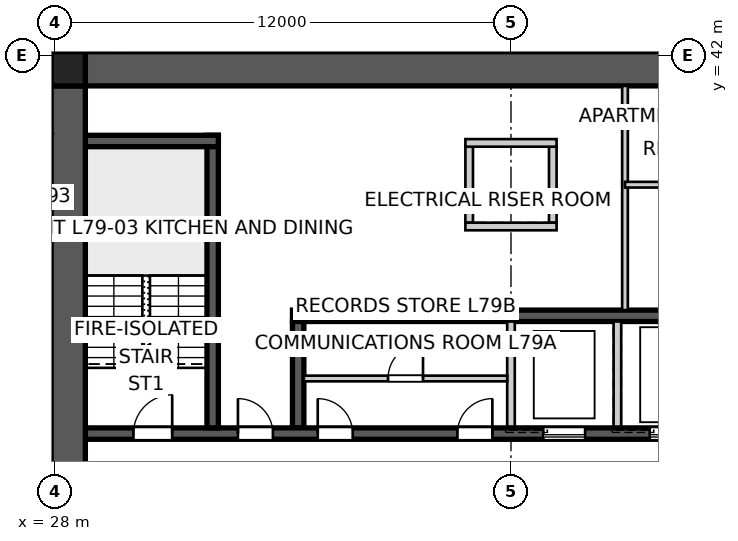
"""IFC4 building model, lengths in metres.
Left out: names, types, materials, properties, quantities, classifications, styles, units other than length and angle.
Written with IfcOpenShell. Run it as: python <this file> out.ifc"""

import sys

from ifc_helpers import new_model, si_unit, direction, frame, frame_2d, origin, origin_2d, place, context, subcontext, project, spatial, polyline, rectangle, outline, extrude, element, fill, save


model = new_model("IFC4")
c1 = context("Model", 3, precision=1e-05, world=origin(), true_north=direction((0.0, 1.0)))
c2 = subcontext(c1, "Body", "Model", "MODEL_VIEW")
j1 = project(units=[si_unit("LENGTHUNIT", "METRE"), si_unit("PLANEANGLEUNIT", "RADIAN")], contexts=[c1])
p1 = place(None, origin())
s1 = spatial("IfcSite", under=j1, at=p1, CompositionType="ELEMENT")
p2 = place(p1, origin())
s2 = spatial("IfcBuilding", under=s1, at=p2, CompositionType="ELEMENT")
p3 = place(p2, frame((0.0, 0.0, 286.2)))
s3 = spatial("IfcBuildingStorey", under=s2, at=p3, CompositionType="ELEMENT", Elevation=286.2)
p4 = place(p3, frame((28.8, 41.65, 0.0), z_axis=(0.0, 0.0, 1.0), x_axis=(1.0, 0.0, 0.0)))
e1 = element("IfcWall", 1, at=p4, inside=s3, PredefinedType="SHEAR", context=c2, shape_type="SweptSolid", body=[
    extrude(outline(polyline([(0.0, -0.45), (22.4, -0.45), (22.4, -0.025), (22.85, -0.025), (22.85, 0.025), (22.4, 0.025), (22.4, 0.45), (0.0, 0.45), (0.0, 0.025), (-0.45, 0.025), (-0.45, -0.025), (0.0, -0.025), (0.0, -0.45)])), origin(), (0.0, 0.0, 1.0), 3.4),
])
p5 = place(p3, frame((28.35, 41.2, 0.0), z_axis=(0.0, 0.0, 1.0), x_axis=(0.0, -1.0, 0.0)))
e2 = element("IfcWall", 2, at=p5, inside=s3, PredefinedType="SHEAR", context=c2, shape_type="SweptSolid", body=[
    extrude(outline(polyline([(0.0, -0.45), (22.4, -0.45), (22.4, -0.025), (22.85, -0.025), (22.85, 0.025), (22.4, 0.025), (22.4, 0.45), (0.0, 0.45), (0.0, 0.025), (-0.45, 0.025), (-0.45, -0.025), (0.0, -0.025), (0.0, -0.45)])), origin(), (0.0, 0.0, 1.0), 3.4),
])
p6 = place(p5, frame((11.14, 0.0, 0.0)))
e3 = element("IfcOpeningElement", 3, at=p6, cuts=e2, PredefinedType="OPENING", context=c2, shape_type="SweptSolid", body=[
    extrude(rectangle(XDim=1.02, YDim=2.4, at=frame_2d((0.51, 1.2))), frame((0.0, 0.46, 0.0), z_axis=(0.0, -1.0, 0.0), x_axis=(1.0, 0.0, 0.0)), (0.0, 0.0, 1.0), 0.92),
])
p7 = place(p3, frame((28.8, 32.05, 0.0), z_axis=(0.0, 0.0, 1.0), x_axis=(1.0, 0.0, 0.0)))
e4 = element("IfcWall", 4, at=p7, inside=s3, PredefinedType="SHEAR", context=c2, shape_type="SweptSolid", body=[
    extrude(rectangle(XDim=22.4, YDim=0.3, at=frame_2d((11.2, 0.0))), origin(), (0.0, 0.0, 1.0), 3.4),
])
p8 = place(p7, frame((19.04, 0.0, 0.0)))
e5 = element("IfcOpeningElement", 5, at=p8, cuts=e4, PredefinedType="OPENING", context=c2, shape_type="SweptSolid", body=[
    extrude(rectangle(XDim=0.92, YDim=2.1, at=frame_2d((0.46, 1.05))), frame((0.0, 0.16, 0.0), z_axis=(0.0, -1.0, 0.0), x_axis=(1.0, 0.0, 0.0)), (0.0, 0.0, 1.0), 0.32),
])
p9 = place(p7, frame((1.265, 0.0, 0.0)))
e6 = element("IfcOpeningElement", 6, at=p9, cuts=e4, PredefinedType="OPENING", context=c2, shape_type="SweptSolid", body=[
    extrude(rectangle(XDim=1.02, YDim=2.1, at=frame_2d((0.51, 1.05))), frame((0.0, 0.16, 0.0), z_axis=(0.0, -1.0, 0.0), x_axis=(1.0, 0.0, 0.0)), (0.0, 0.0, 1.0), 0.32),
])
p10 = place(p7, frame((4.015, 0.0, 0.0)))
e7 = element("IfcOpeningElement", 7, at=p10, cuts=e4, PredefinedType="OPENING", context=c2, shape_type="SweptSolid", body=[
    extrude(rectangle(XDim=0.92, YDim=2.1, at=frame_2d((0.46, 1.05))), frame((0.0, 0.16, 0.0), z_axis=(0.0, -1.0, 0.0), x_axis=(1.0, 0.0, 0.0)), (0.0, 0.0, 1.0), 0.32),
])
p11 = place(p7, frame((6.115, 0.0, 0.0)))
e8 = element("IfcOpeningElement", 8, at=p11, cuts=e4, PredefinedType="OPENING", context=c2, shape_type="SweptSolid", body=[
    extrude(rectangle(XDim=0.92, YDim=2.1, at=frame_2d((0.46, 1.05))), frame((0.0, 0.16, 0.0), z_axis=(0.0, -1.0, 0.0), x_axis=(1.0, 0.0, 0.0)), (0.0, 0.0, 1.0), 0.32),
])
p12 = place(p7, frame((9.79, 0.0, 0.0)))
e9 = element("IfcOpeningElement", 9, at=p12, cuts=e4, PredefinedType="OPENING", context=c2, shape_type="SweptSolid", body=[
    extrude(rectangle(XDim=0.92, YDim=2.1, at=frame_2d((0.46, 1.05))), frame((0.0, 0.16, 0.0), z_axis=(0.0, -1.0, 0.0), x_axis=(1.0, 0.0, 0.0)), (0.0, 0.0, 1.0), 0.32),
])
p13 = place(p7, frame((12.05, 0.0, 0.0)))
e10 = element("IfcOpeningElement", 10, at=p13, cuts=e4, PredefinedType="OPENING", context=c2, shape_type="SweptSolid", body=[
    extrude(rectangle(XDim=1.1, YDim=2.1, at=frame_2d((0.55, 1.05))), frame((0.0, 0.16, 0.0), z_axis=(0.0, -1.0, 0.0), x_axis=(1.0, 0.0, 0.0)), (0.0, 0.0, 1.0), 0.32),
])
p14 = place(p7, frame((14.85, 0.0, 0.0)))
e11 = element("IfcOpeningElement", 11, at=p14, cuts=e4, PredefinedType="OPENING", context=c2, shape_type="SweptSolid", body=[
    extrude(rectangle(XDim=1.1, YDim=2.1, at=frame_2d((0.55, 1.05))), frame((0.0, 0.16, 0.0), z_axis=(0.0, -1.0, 0.0), x_axis=(1.0, 0.0, 0.0)), (0.0, 0.0, 1.0), 0.32),
])
p15 = place(p3, frame((34.25, 35.15, 0.0), z_axis=(0.0, 0.0, 1.0), x_axis=(1.0, 0.0, 0.0)))
e12 = element("IfcWall", 12, at=p15, inside=s3, PredefinedType="SHEAR", context=c2, shape_type="SweptSolid", body=[
    extrude(rectangle(XDim=11.5, YDim=0.3, at=frame_2d((5.75, 0.0))), origin(), (0.0, 0.0, 1.0), 3.4),
])
p16 = place(p3, frame((34.4, 32.2, 0.0), z_axis=(0.0, 0.0, 1.0), x_axis=(0.0, 1.0, 0.0)))
e13 = element("IfcWall", 13, at=p16, inside=s3, PredefinedType="SHEAR", context=c2, shape_type="SweptSolid", body=[
    extrude(rectangle(XDim=2.8, YDim=0.3, at=frame_2d((1.4, 0.0))), origin(), (0.0, 0.0, 1.0), 3.4),
])
for number, where, z_axis, x_axis in (
    (14, (40.0, 32.2, 0.0), (0.0, 0.0, 1.0), (0.0, 1.0, 0.0)),
    (15, (42.8, 32.2, 0.0), (0.0, 0.0, 1.0), (0.0, 1.0, 0.0)),
):
    element("IfcWall", number, at=place(p3, frame(where, z_axis=z_axis, x_axis=x_axis)), inside=s3, PredefinedType="SOLIDWALL", context=c2, shape_type="SweptSolid", body=[
        extrude(rectangle(XDim=2.8, YDim=0.2, at=frame_2d((1.4, 0.0))), origin(), (0.0, 0.0, 1.0), 3.4),
    ])
p17 = place(p3, frame((32.15, 32.2, 0.0), z_axis=(0.0, 0.0, 1.0), x_axis=(0.0, 1.0, 0.0)))
e16 = element("IfcWall", 16, at=p17, inside=s3, PredefinedType="SHEAR", context=c2, shape_type="SweptSolid", body=[
    extrude(rectangle(XDim=7.7, YDim=0.3, at=frame_2d((3.85, 0.0))), origin(), (0.0, 0.0, 1.0), 3.4),
])
p18 = place(p3, frame((28.8, 39.75, 0.0), z_axis=(0.0, 0.0, 1.0), x_axis=(1.0, 0.0, 0.0)))
e17 = element("IfcWall", 17, at=p18, inside=s3, PredefinedType="SHEAR", context=c2, shape_type="SweptSolid", body=[
    extrude(rectangle(XDim=3.5, YDim=0.3, at=frame_2d((1.75, 0.0))), origin(), (0.0, 0.0, 1.0), 3.4),
])
for number, where, z_axis, x_axis in (
    (18, (38.9, 37.6, 0.0), (0.0, 0.0, 1.0), (0.0, 1.0, 0.0)),
    (19, (41.1, 37.6, 0.0), (0.0, 0.0, 1.0), (0.0, 1.0, 0.0)),
):
    element("IfcWall", number, at=place(p3, frame(where, z_axis=z_axis, x_axis=x_axis)), inside=s3, PredefinedType="SOLIDWALL", context=c2, shape_type="SweptSolid", body=[
        extrude(rectangle(XDim=2.0, YDim=0.2, at=frame_2d((1.0, 0.0))), origin(), (0.0, 0.0, 1.0), 3.4),
    ])
for number, where, z_axis, x_axis in (
    (20, (38.8, 37.5, 0.0), (0.0, 0.0, 1.0), (1.0, 0.0, 0.0)),
    (21, (38.8, 39.7, 0.0), (0.0, 0.0, 1.0), (1.0, 0.0, 0.0)),
):
    element("IfcWall", number, at=place(p3, frame(where, z_axis=z_axis, x_axis=x_axis)), inside=s3, PredefinedType="SOLIDWALL", context=c2, shape_type="SweptSolid", body=[
        extrude(rectangle(XDim=2.4, YDim=0.2, at=frame_2d((1.2, 0.0))), origin(), (0.0, 0.0, 1.0), 3.4),
    ])
p19 = place(p3, frame((28.35, 41.65, 0.0), z_axis=(0.0, 0.0, 1.0), x_axis=(1.0, 0.0, 0.0)))
e22 = element("IfcColumn", 22, at=p19, inside=s3, PredefinedType="COLUMN", context=c2, shape_type="SweptSolid", body=[
    extrude(rectangle(XDim=0.9, YDim=0.9, at=origin_2d()), origin(), (0.0, 0.0, 1.0), 3.4),
])
p20 = place(p3, frame((26.823, 45.704, 0.0), z_axis=(0.0, 0.0, 1.0), x_axis=(0.64279957712, -0.76603440109, 0.0)))
e23 = element("IfcWall", 23, at=p20, inside=s3, PredefinedType="PARTITIONING", context=c2, shape_type="SweptSolid", body=[
    extrude(rectangle(XDim=4.64, YDim=0.25, at=frame_2d((2.32, 0.0))), origin(), (0.0, 0.0, 1.0), 3.25),
])
p21 = place(p3, frame((43.0, 41.2, 0.0), z_axis=(0.0, 0.0, 1.0), x_axis=(0.0, -1.0, 0.0)))
e24 = element("IfcWall", 24, at=p21, inside=s3, PredefinedType="SOLIDWALL", context=c2, shape_type="SweptSolid", body=[
    extrude(rectangle(XDim=5.9, YDim=0.15, at=frame_2d((2.95, 0.0))), origin(), (0.0, 0.0, 1.0), 3.25),
])
p22 = place(p3, frame((43.0, 38.6, 0.0), z_axis=(0.0, 0.0, 1.0), x_axis=(1.0, 0.0, 0.0)))
e25 = element("IfcWall", 25, at=p22, inside=s3, PredefinedType="SOLIDWALL", context=c2, shape_type="SweptSolid", body=[
    extrude(rectangle(XDim=8.2, YDim=0.15, at=frame_2d((4.1, 0.0))), origin(), (0.0, 0.0, 1.0), 3.25),
])
p23 = place(p22, frame((3.64, 0.0, 0.0)))
e26 = element("IfcOpeningElement", 26, at=p23, cuts=e25, PredefinedType="OPENING", context=c2, shape_type="SweptSolid", body=[
    extrude(rectangle(XDim=0.92, YDim=2.1, at=frame_2d((0.46, 1.05))), frame((0.0, 0.085, 0.0), z_axis=(0.0, -1.0, 0.0), x_axis=(1.0, 0.0, 0.0)), (0.0, 0.0, 1.0), 0.17),
])
p24 = place(p3, frame((27.9, 39.913, 0.0), z_axis=(0.0, 0.0, 1.0), x_axis=(-0.64279031777, 0.766042170759, 0.0)))
e27 = element("IfcWall", 27, at=p24, inside=s3, PredefinedType="PARTITIONING", context=c2, shape_type="SweptSolid", body=[
    extrude(rectangle(XDim=5.089, YDim=0.12, at=frame_2d((2.544, 0.0))), origin(), (0.0, 0.0, 1.0), 3.25),
])
p25 = place(p24, frame((2.084, 0.0, 0.0)))
e28 = element("IfcOpeningElement", 28, at=p25, cuts=e27, PredefinedType="OPENING", context=c2, shape_type="SweptSolid", body=[
    extrude(rectangle(XDim=0.96, YDim=2.1, at=frame_2d((0.48, 1.05))), frame((0.0, 0.07, 0.0), z_axis=(0.0, -1.0, 0.0), x_axis=(1.0, 0.0, 0.0)), (0.0, 0.0, 1.0), 0.14),
])
p26 = place(p3, frame((34.55, 33.5, 0.0), z_axis=(0.0, 0.0, 1.0), x_axis=(1.0, 0.0, 0.0)))
e29 = element("IfcWall", 29, at=p26, inside=s3, PredefinedType="SOLIDWALL", context=c2, shape_type="SweptSolid", body=[
    extrude(rectangle(XDim=5.35, YDim=0.15, at=frame_2d((2.675, 0.0))), origin(), (0.0, 0.0, 1.0), 3.25),
])
p27 = place(p26, frame((2.215, 0.0, 0.0)))
e30 = element("IfcOpeningElement", 30, at=p27, cuts=e29, PredefinedType="OPENING", context=c2, shape_type="SweptSolid", body=[
    extrude(rectangle(XDim=0.92, YDim=2.1, at=frame_2d((0.46, 1.05))), frame((0.0, 0.085, 0.0), z_axis=(0.0, -1.0, 0.0), x_axis=(1.0, 0.0, 0.0)), (0.0, 0.0, 1.0), 0.17),
])
p28 = place(p9, origin())
e31 = element("IfcDoor", 31, at=p28, inside=s3, OperationType="SINGLE_SWING_RIGHT", PredefinedType="DOOR", context=c2, shape_type="SweptSolid", body=[
    extrude(rectangle(XDim=1.02, YDim=2.1, at=frame_2d((0.51, 1.05))), frame((0.0, 0.025, 0.0), z_axis=(0.0, -1.0, 0.0), x_axis=(1.0, 0.0, 0.0)), (0.0, 0.0, 1.0), 0.05),
])
fill(e6, e31)
p29 = place(p10, origin())
e32 = element("IfcDoor", 32, at=p29, inside=s3, OperationType="SINGLE_SWING_LEFT", PredefinedType="DOOR", context=c2, shape_type="SweptSolid", body=[
    extrude(rectangle(XDim=0.92, YDim=2.1, at=frame_2d((0.46, 1.05))), frame((0.0, 0.025, 0.0), z_axis=(0.0, -1.0, 0.0), x_axis=(1.0, 0.0, 0.0)), (0.0, 0.0, 1.0), 0.05),
])
fill(e7, e32)
p30 = place(p11, origin())
e33 = element("IfcDoor", 33, at=p30, inside=s3, OperationType="SINGLE_SWING_LEFT", PredefinedType="DOOR", context=c2, shape_type="SweptSolid", body=[
    extrude(rectangle(XDim=0.92, YDim=2.1, at=frame_2d((0.46, 1.05))), frame((0.0, 0.025, 0.0), z_axis=(0.0, -1.0, 0.0), x_axis=(1.0, 0.0, 0.0)), (0.0, 0.0, 1.0), 0.05),
])
fill(e8, e33)
p31 = place(p12, origin())
e34 = element("IfcDoor", 34, at=p31, inside=s3, OperationType="SINGLE_SWING_RIGHT", PredefinedType="DOOR", context=c2, shape_type="SweptSolid", body=[
    extrude(rectangle(XDim=0.92, YDim=2.1, at=frame_2d((0.46, 1.05))), frame((0.0, 0.025, 0.0), z_axis=(0.0, -1.0, 0.0), x_axis=(1.0, 0.0, 0.0)), (0.0, 0.0, 1.0), 0.05),
])
fill(e9, e34)
p32 = place(p27, origin())
e35 = element("IfcDoor", 35, at=p32, inside=s3, OperationType="SINGLE_SWING_RIGHT", PredefinedType="DOOR", context=c2, shape_type="SweptSolid", body=[
    extrude(rectangle(XDim=0.92, YDim=2.1, at=frame_2d((0.46, 1.05))), frame((0.0, 0.025, 0.0), z_axis=(0.0, -1.0, 0.0), x_axis=(1.0, 0.0, 0.0)), (0.0, 0.0, 1.0), 0.05),
])
fill(e30, e35)
p33 = place(p13, origin())
e36 = element("IfcDoor", 36, at=p33, inside=s3, OperationType="SLIDING_TO_LEFT", PredefinedType="DOOR", context=c2, shape_type="SweptSolid", body=[
    extrude(rectangle(XDim=1.1, YDim=2.1, at=frame_2d((0.55, 1.05))), frame((0.0, 0.025, 0.0), z_axis=(0.0, -1.0, 0.0), x_axis=(1.0, 0.0, 0.0)), (0.0, 0.0, 1.0), 0.05),
])
fill(e10, e36)
p34 = place(p14, origin())
e37 = element("IfcDoor", 37, at=p34, inside=s3, OperationType="SLIDING_TO_LEFT", PredefinedType="DOOR", context=c2, shape_type="SweptSolid", body=[
    extrude(rectangle(XDim=1.1, YDim=2.1, at=frame_2d((0.55, 1.05))), frame((0.0, 0.025, 0.0), z_axis=(0.0, -1.0, 0.0), x_axis=(1.0, 0.0, 0.0)), (0.0, 0.0, 1.0), 0.05),
])
fill(e11, e37)
save(model, sys.argv[1])
